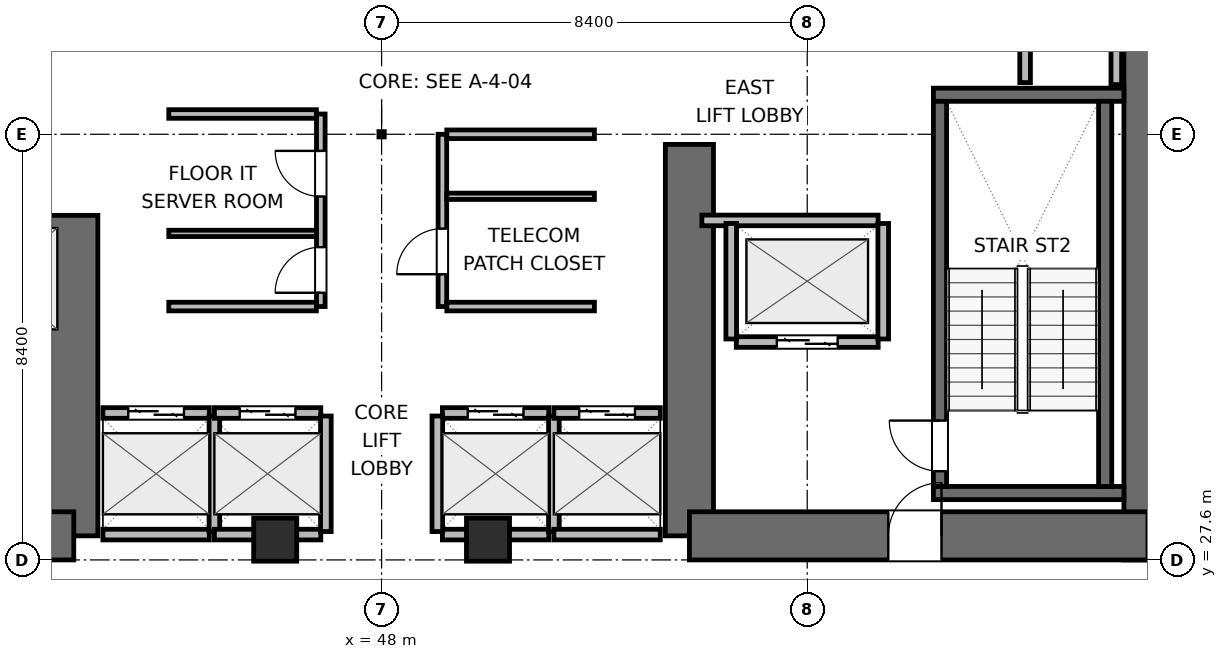
"""IFC4 building model, lengths in metres.
Left out: names, types, materials, properties, quantities, classifications, styles, units other than length and angle.
Written with IfcOpenShell. Run it as: python <this file> out.ifc"""

import sys

from ifc_helpers import new_model, si_unit, direction, frame, frame_2d, origin, origin_2d, place, context, subcontext, project, spatial, rectangle, extrude, element, fill, save


model = new_model("IFC4")
c1 = context("Model", 3, precision=1e-05, world=origin(), true_north=direction((0.0, 1.0)))
c2 = subcontext(c1, "Body", "Model", "MODEL_VIEW")
j1 = project(units=[si_unit("LENGTHUNIT", "METRE"), si_unit("PLANEANGLEUNIT", "RADIAN")], contexts=[c1])
p1 = place(None, origin())
s1 = spatial("IfcSite", under=j1, at=p1, CompositionType="ELEMENT")
p2 = place(p1, origin())
s2 = spatial("IfcBuilding", under=s1, at=p2, CompositionType="ELEMENT")
p3 = place(p2, frame((0.0, 0.0, 33.3)))
s3 = spatial("IfcBuildingStorey", under=s2, at=p3, CompositionType="ELEMENT", Elevation=33.3)
p4 = place(p3, frame((41.925, 28.075, 0.0), z_axis=(0.0, 0.0, 1.0), x_axis=(0.0, 1.0, 0.0)))
e1 = element("IfcWall", 1, at=p4, inside=s3, PredefinedType="SHEAR", context=c2, shape_type="SweptSolid", body=[
    extrude(rectangle(XDim=6.325, YDim=0.95, at=frame_2d((3.163, 0.0))), origin(), (0.0, 0.0, 1.0), 3.9),
])
p5 = place(p3, frame((32.875, 28.075, 0.0), z_axis=(0.0, 0.0, 1.0), x_axis=(1.0, 0.0, 0.0)))
e2 = element("IfcWall", 2, at=p5, inside=s3, PredefinedType="SHEAR", context=c2, shape_type="SweptSolid", body=[
    extrude(rectangle(XDim=9.05, YDim=0.95, at=frame_2d((4.525, 0.0))), origin(), (0.0, 0.0, 1.0), 3.9),
])
p6 = place(p5, frame((4.975, 0.0, 0.0)))
e3 = element("IfcOpeningElement", 3, at=p6, cuts=e2, PredefinedType="OPENING", context=c2, shape_type="SweptSolid", body=[
    extrude(rectangle(XDim=1.05, YDim=2.04, at=frame_2d((0.525, 1.02))), frame((0.0, 0.485, 0.0), z_axis=(0.0, -1.0, 0.0), x_axis=(1.0, 0.0, 0.0)), (0.0, 0.0, 1.0), 0.97),
])
p7 = place(p3, frame((54.075, 28.075, 0.0), z_axis=(0.0, 0.0, 1.0), x_axis=(0.0, 1.0, 0.0)))
e4 = element("IfcWall", 4, at=p7, inside=s3, PredefinedType="SHEAR", context=c2, shape_type="SweptSolid", body=[
    extrude(rectangle(XDim=7.725, YDim=0.95, at=frame_2d((3.863, 0.0))), origin(), (0.0, 0.0, 1.0), 3.9),
])
p8 = place(p3, frame((63.125, 27.6, 0.0), z_axis=(0.0, 0.0, 1.0), x_axis=(0.0, 1.0, 0.0)))
e5 = element("IfcWall", 5, at=p8, inside=s3, PredefinedType="SHEAR", context=c2, shape_type="SweptSolid", body=[
    extrude(rectangle(XDim=16.8, YDim=0.95, at=frame_2d((8.4, 0.0))), origin(), (0.0, 0.0, 1.0), 3.9),
])
p9 = place(p3, frame((54.075, 28.075, 0.0), z_axis=(0.0, 0.0, 1.0), x_axis=(1.0, 0.0, 0.0)))
e6 = element("IfcWall", 6, at=p9, inside=s3, PredefinedType="SHEAR", context=c2, shape_type="SweptSolid", body=[
    extrude(rectangle(XDim=9.05, YDim=0.95, at=frame_2d((4.525, 0.0))), origin(), (0.0, 0.0, 1.0), 3.9),
])
p10 = place(p9, frame((3.925, 0.0, 0.0)))
e7 = element("IfcOpeningElement", 7, at=p10, cuts=e6, PredefinedType="OPENING", context=c2, shape_type="SweptSolid", body=[
    extrude(rectangle(XDim=1.05, YDim=2.04, at=frame_2d((0.525, 1.02))), frame((0.0, 0.485, 0.0), z_axis=(0.0, -1.0, 0.0), x_axis=(1.0, 0.0, 0.0)), (0.0, 0.0, 1.0), 0.97),
])
for number, where, z_axis, x_axis in (
    (8, (58.89, 28.92, 0.0), (0.0, 0.0, 1.0), (1.0, 0.0, 0.0)),
    (9, (58.89, 36.78, 0.0), (0.0, 0.0, 1.0), (1.0, 0.0, 0.0)),
):
    element("IfcWall", number, at=place(p3, frame(where, z_axis=z_axis, x_axis=x_axis)), inside=s3, PredefinedType="SHEAR", context=c2, shape_type="SweptSolid", body=[
        extrude(rectangle(XDim=3.76, YDim=0.26, at=frame_2d((1.88, 0.0))), origin(), (0.0, 0.0, 1.0), 3.9),
    ])
p11 = place(p3, frame((59.02, 29.05, 0.0), z_axis=(0.0, 0.0, 1.0), x_axis=(0.0, 1.0, 0.0)))
e10 = element("IfcWall", 10, at=p11, inside=s3, PredefinedType="SHEAR", context=c2, shape_type="SweptSolid", body=[
    extrude(rectangle(XDim=7.6, YDim=0.26, at=frame_2d((3.8, 0.0))), origin(), (0.0, 0.0, 1.0), 3.9),
])
p12 = place(p11, frame((0.3, 0.0, 0.0)))
e11 = element("IfcOpeningElement", 11, at=p12, cuts=e10, PredefinedType="OPENING", context=c2, shape_type="SweptSolid", body=[
    extrude(rectangle(XDim=1.0, YDim=2.04, at=frame_2d((0.5, 1.02))), frame((0.0, 0.14, 0.0), z_axis=(0.0, -1.0, 0.0), x_axis=(1.0, 0.0, 0.0)), (0.0, 0.0, 1.0), 0.28),
])
p13 = place(p3, frame((62.28, 29.05, 0.0), z_axis=(0.0, 0.0, 1.0), x_axis=(0.0, 1.0, 0.0)))
e12 = element("IfcWall", 12, at=p13, inside=s3, PredefinedType="SHEAR", context=c2, shape_type="SweptSolid", body=[
    extrude(rectangle(XDim=7.6, YDim=0.26, at=frame_2d((3.8, 0.0))), origin(), (0.0, 0.0, 1.0), 3.9),
])
for number, where, z_axis, x_axis in (
    (13, (45.9, 28.0, 0.0), (0.0, 0.0, 1.0), (1.0, 0.0, 0.0)),
    (14, (50.1, 28.0, 0.0), (0.0, 0.0, 1.0), (1.0, 0.0, 0.0)),
):
    element("IfcColumn", number, at=place(p3, frame(where, z_axis=z_axis, x_axis=x_axis)), inside=s3, PredefinedType="COLUMN", context=c2, shape_type="SweptSolid", body=[
        extrude(rectangle(XDim=0.85, YDim=0.85, at=origin_2d()), origin(), (0.0, 0.0, 1.0), 3.9),
    ])
p14 = place(p3, frame((60.7, 37.02, 0.0), z_axis=(0.0, 0.0, 1.0), x_axis=(0.0, 1.0, 0.0)))
e15 = element("IfcWall", 15, at=p14, inside=s3, PredefinedType="PARTITIONING", context=c2, shape_type="SweptSolid", body=[
    extrude(rectangle(XDim=1.96, YDim=0.21, at=frame_2d((0.98, 0.0))), origin(), (0.0, 0.0, 1.0), 3.64),
])
p15 = place(p3, frame((62.5, 36.98, 0.0), z_axis=(0.0, 0.0, 1.0), x_axis=(0.0, 1.0, 0.0)))
e16 = element("IfcWall", 16, at=p15, inside=s3, PredefinedType="PARTITIONING", context=c2, shape_type="SweptSolid", body=[
    extrude(rectangle(XDim=2.04, YDim=0.21, at=frame_2d((1.02, 0.0))), origin(), (0.0, 0.0, 1.0), 3.64),
])
p16 = place(p3, frame((55.0, 31.9, 0.0), z_axis=(0.0, 0.0, 1.0), x_axis=(1.0, 0.0, 0.0)))
e17 = element("IfcWall", 17, at=p16, inside=s3, PredefinedType="PARTITIONING", context=c2, shape_type="SweptSolid", body=[
    extrude(rectangle(XDim=2.8, YDim=0.21, at=frame_2d((1.4, 0.0))), origin(), (0.0, 0.0, 1.0), 3.64),
])
p17 = place(p16, frame((0.8, 0.0, 0.0)))
e18 = element("IfcOpeningElement", 18, at=p17, cuts=e17, PredefinedType="OPENING", context=c2, shape_type="SweptSolid", body=[
    extrude(rectangle(XDim=1.2, YDim=2.04, at=frame_2d((0.6, 1.02))), frame((0.0, 0.115, 0.0), z_axis=(0.0, -1.0, 0.0), x_axis=(1.0, 0.0, 0.0)), (0.0, 0.0, 1.0), 0.23),
])
p18 = place(p3, frame((54.32, 34.3, 0.0), z_axis=(0.0, 0.0, 1.0), x_axis=(1.0, 0.0, 0.0)))
e19 = element("IfcWall", 19, at=p18, inside=s3, PredefinedType="PARTITIONING", context=c2, shape_type="SweptSolid", body=[
    extrude(rectangle(XDim=3.48, YDim=0.21, at=frame_2d((1.74, 0.0))), origin(), (0.0, 0.0, 1.0), 3.64),
])
for number, where, z_axis, x_axis in (
    (20, (54.9, 31.96, 0.0), (0.0, 0.0, 1.0), (0.0, 1.0, 0.0)),
    (21, (57.9, 31.96, 0.0), (0.0, 0.0, 1.0), (0.0, 1.0, 0.0)),
):
    element("IfcWall", number, at=place(p3, frame(where, z_axis=z_axis, x_axis=x_axis)), inside=s3, PredefinedType="PARTITIONING", context=c2, shape_type="SweptSolid", body=[
        extrude(rectangle(XDim=2.28, YDim=0.21, at=frame_2d((1.14, 0.0))), origin(), (0.0, 0.0, 1.0), 3.64),
    ])
p19 = place(p3, frame((42.5, 30.5, 0.0), z_axis=(0.0, 0.0, 1.0), x_axis=(1.0, 0.0, 0.0)))
e22 = element("IfcWall", 22, at=p19, inside=s3, PredefinedType="PARTITIONING", context=c2, shape_type="SweptSolid", body=[
    extrude(rectangle(XDim=2.1, YDim=0.21, at=frame_2d((1.05, 0.0))), origin(), (0.0, 0.0, 1.0), 3.64),
])
p20 = place(p19, frame((0.5, 0.0, 0.0)))
e23 = element("IfcOpeningElement", 23, at=p20, cuts=e22, PredefinedType="OPENING", context=c2, shape_type="SweptSolid", body=[
    extrude(rectangle(XDim=1.1, YDim=2.04, at=frame_2d((0.55, 1.02))), frame((0.0, 0.115, 0.0), z_axis=(0.0, -1.0, 0.0), x_axis=(1.0, 0.0, 0.0)), (0.0, 0.0, 1.0), 0.23),
])
p21 = place(p3, frame((42.5, 28.1, 0.0), z_axis=(0.0, 0.0, 1.0), x_axis=(1.0, 0.0, 0.0)))
e24 = element("IfcWall", 24, at=p21, inside=s3, PredefinedType="PARTITIONING", context=c2, shape_type="SweptSolid", body=[
    extrude(rectangle(XDim=2.1, YDim=0.21, at=frame_2d((1.05, 0.0))), origin(), (0.0, 0.0, 1.0), 2.525),
])
p22 = place(p3, frame((44.7, 28.16, 0.0), z_axis=(0.0, 0.0, 1.0), x_axis=(0.0, 1.0, 0.0)))
e25 = element("IfcWall", 25, at=p22, inside=s3, PredefinedType="PARTITIONING", context=c2, shape_type="SweptSolid", body=[
    extrude(rectangle(XDim=2.28, YDim=0.21, at=frame_2d((1.14, 0.0))), origin(), (0.0, 0.0, 1.0), 3.64),
])
p23 = place(p3, frame((44.7, 30.5, 0.0), z_axis=(0.0, 0.0, 1.0), x_axis=(1.0, 0.0, 0.0)))
e26 = element("IfcWall", 26, at=p23, inside=s3, PredefinedType="PARTITIONING", context=c2, shape_type="SweptSolid", body=[
    extrude(rectangle(XDim=2.1, YDim=0.21, at=frame_2d((1.05, 0.0))), origin(), (0.0, 0.0, 1.0), 3.64),
])
p24 = place(p23, frame((0.5, 0.0, 0.0)))
e27 = element("IfcOpeningElement", 27, at=p24, cuts=e26, PredefinedType="OPENING", context=c2, shape_type="SweptSolid", body=[
    extrude(rectangle(XDim=1.1, YDim=2.04, at=frame_2d((0.55, 1.02))), frame((0.0, 0.115, 0.0), z_axis=(0.0, -1.0, 0.0), x_axis=(1.0, 0.0, 0.0)), (0.0, 0.0, 1.0), 0.23),
])
p25 = place(p3, frame((44.7, 28.1, 0.0), z_axis=(0.0, 0.0, 1.0), x_axis=(1.0, 0.0, 0.0)))
e28 = element("IfcWall", 28, at=p25, inside=s3, PredefinedType="PARTITIONING", context=c2, shape_type="SweptSolid", body=[
    extrude(rectangle(XDim=2.1, YDim=0.21, at=frame_2d((1.05, 0.0))), origin(), (0.0, 0.0, 1.0), 2.525),
])
p26 = place(p3, frame((46.9, 28.16, 0.0), z_axis=(0.0, 0.0, 1.0), x_axis=(0.0, 1.0, 0.0)))
e29 = element("IfcWall", 29, at=p26, inside=s3, PredefinedType="PARTITIONING", context=c2, shape_type="SweptSolid", body=[
    extrude(rectangle(XDim=2.28, YDim=0.21, at=frame_2d((1.14, 0.0))), origin(), (0.0, 0.0, 1.0), 3.64),
])
p27 = place(p3, frame((49.2, 30.5, 0.0), z_axis=(0.0, 0.0, 1.0), x_axis=(1.0, 0.0, 0.0)))
e30 = element("IfcWall", 30, at=p27, inside=s3, PredefinedType="PARTITIONING", context=c2, shape_type="SweptSolid", body=[
    extrude(rectangle(XDim=2.1, YDim=0.21, at=frame_2d((1.05, 0.0))), origin(), (0.0, 0.0, 1.0), 3.64),
])
p28 = place(p27, frame((0.5, 0.0, 0.0)))
e31 = element("IfcOpeningElement", 31, at=p28, cuts=e30, PredefinedType="OPENING", context=c2, shape_type="SweptSolid", body=[
    extrude(rectangle(XDim=1.1, YDim=2.04, at=frame_2d((0.55, 1.02))), frame((0.0, 0.115, 0.0), z_axis=(0.0, -1.0, 0.0), x_axis=(1.0, 0.0, 0.0)), (0.0, 0.0, 1.0), 0.23),
])
p29 = place(p3, frame((49.2, 28.1, 0.0), z_axis=(0.0, 0.0, 1.0), x_axis=(1.0, 0.0, 0.0)))
e32 = element("IfcWall", 32, at=p29, inside=s3, PredefinedType="PARTITIONING", context=c2, shape_type="SweptSolid", body=[
    extrude(rectangle(XDim=2.1, YDim=0.21, at=frame_2d((1.05, 0.0))), origin(), (0.0, 0.0, 1.0), 2.525),
])
for number, where, z_axis, x_axis in (
    (33, (49.1, 28.16, 0.0), (0.0, 0.0, 1.0), (0.0, 1.0, 0.0)),
    (34, (51.4, 28.16, 0.0), (0.0, 0.0, 1.0), (0.0, 1.0, 0.0)),
):
    element("IfcWall", number, at=place(p3, frame(where, z_axis=z_axis, x_axis=x_axis)), inside=s3, PredefinedType="PARTITIONING", context=c2, shape_type="SweptSolid", body=[
        extrude(rectangle(XDim=2.28, YDim=0.21, at=frame_2d((1.14, 0.0))), origin(), (0.0, 0.0, 1.0), 3.64),
    ])
p30 = place(p3, frame((51.4, 30.5, 0.0), z_axis=(0.0, 0.0, 1.0), x_axis=(1.0, 0.0, 0.0)))
e35 = element("IfcWall", 35, at=p30, inside=s3, PredefinedType="PARTITIONING", context=c2, shape_type="SweptSolid", body=[
    extrude(rectangle(XDim=2.1, YDim=0.21, at=frame_2d((1.05, 0.0))), origin(), (0.0, 0.0, 1.0), 3.64),
])
p31 = place(p30, frame((0.5, 0.0, 0.0)))
e36 = element("IfcOpeningElement", 36, at=p31, cuts=e35, PredefinedType="OPENING", context=c2, shape_type="SweptSolid", body=[
    extrude(rectangle(XDim=1.1, YDim=2.04, at=frame_2d((0.55, 1.02))), frame((0.0, 0.115, 0.0), z_axis=(0.0, -1.0, 0.0), x_axis=(1.0, 0.0, 0.0)), (0.0, 0.0, 1.0), 0.23),
])
p32 = place(p3, frame((51.4, 28.1, 0.0), z_axis=(0.0, 0.0, 1.0), x_axis=(1.0, 0.0, 0.0)))
e37 = element("IfcWall", 37, at=p32, inside=s3, PredefinedType="PARTITIONING", context=c2, shape_type="SweptSolid", body=[
    extrude(rectangle(XDim=2.1, YDim=0.21, at=frame_2d((1.05, 0.0))), origin(), (0.0, 0.0, 1.0), 2.525),
])
p33 = place(p3, frame((46.8, 32.6, 0.0), z_axis=(0.0, 0.0, 1.0), x_axis=(0.0, 1.0, 0.0)))
e38 = element("IfcWall", 38, at=p33, inside=s3, PredefinedType="PARTITIONING", context=c2, shape_type="SweptSolid", body=[
    extrude(rectangle(XDim=3.8, YDim=0.17, at=frame_2d((1.9, 0.0))), origin(), (0.0, 0.0, 1.0), 3.64),
])
p34 = place(p33, frame((0.272, 0.0, 0.0)))
e39 = element("IfcOpeningElement", 39, at=p34, cuts=e38, PredefinedType="OPENING", context=c2, shape_type="SweptSolid", body=[
    extrude(rectangle(XDim=0.9, YDim=2.02, at=frame_2d((0.45, 1.01))), frame((0.0, 0.095, 0.0), z_axis=(0.0, -1.0, 0.0), x_axis=(1.0, 0.0, 0.0)), (0.0, 0.0, 1.0), 0.19),
])
p35 = place(p33, frame((2.172, 0.0, 0.0)))
e40 = element("IfcOpeningElement", 40, at=p35, cuts=e38, PredefinedType="OPENING", context=c2, shape_type="SweptSolid", body=[
    extrude(rectangle(XDim=0.9, YDim=2.02, at=frame_2d((0.45, 1.01))), frame((0.0, 0.095, 0.0), z_axis=(0.0, -1.0, 0.0), x_axis=(1.0, 0.0, 0.0)), (0.0, 0.0, 1.0), 0.19),
])
for number, where, z_axis, x_axis in (
    (41, (43.8, 32.6, 0.0), (0.0, 0.0, 1.0), (1.0, 0.0, 0.0)),
    (42, (43.8, 36.4, 0.0), (0.0, 0.0, 1.0), (1.0, 0.0, 0.0)),
):
    element("IfcWall", number, at=place(p3, frame(where, z_axis=z_axis, x_axis=x_axis)), inside=s3, PredefinedType="PARTITIONING", context=c2, shape_type="SweptSolid", body=[
        extrude(rectangle(XDim=2.913, YDim=0.17, at=frame_2d((1.457, 0.0))), origin(), (0.0, 0.0, 1.0), 3.64),
    ])
p36 = place(p3, frame((43.8, 34.044, 0.0), z_axis=(0.0, 0.0, 1.0), x_axis=(1.0, 0.0, 0.0)))
e43 = element("IfcWall", 43, at=p36, inside=s3, PredefinedType="PARTITIONING", context=c2, shape_type="SweptSolid", body=[
    extrude(rectangle(XDim=2.913, YDim=0.125, at=frame_2d((1.457, 0.0))), origin(), (0.0, 0.0, 1.0), 3.64),
])
p37 = place(p3, frame((49.2, 32.6, 0.0), z_axis=(0.0, 0.0, 1.0), x_axis=(0.0, 1.0, 0.0)))
e44 = element("IfcWall", 44, at=p37, inside=s3, PredefinedType="PARTITIONING", context=c2, shape_type="SweptSolid", body=[
    extrude(rectangle(XDim=3.4, YDim=0.17, at=frame_2d((1.7, 0.0))), origin(), (0.0, 0.0, 1.0), 3.64),
])
p38 = place(p37, frame((0.638, 0.0, 0.0)))
e45 = element("IfcOpeningElement", 45, at=p38, cuts=e44, PredefinedType="OPENING", context=c2, shape_type="SweptSolid", body=[
    extrude(rectangle(XDim=0.9, YDim=2.02, at=frame_2d((0.45, 1.01))), frame((0.0, 0.095, 0.0), z_axis=(0.0, -1.0, 0.0), x_axis=(1.0, 0.0, 0.0)), (0.0, 0.0, 1.0), 0.19),
])
for number, where, z_axis, x_axis in (
    (46, (49.287, 32.6, 0.0), (0.0, 0.0, 1.0), (1.0, 0.0, 0.0)),
    (47, (49.287, 36.0, 0.0), (0.0, 0.0, 1.0), (1.0, 0.0, 0.0)),
):
    element("IfcWall", number, at=place(p3, frame(where, z_axis=z_axis, x_axis=x_axis)), inside=s3, PredefinedType="PARTITIONING", context=c2, shape_type="SweptSolid", body=[
        extrude(rectangle(XDim=2.913, YDim=0.17, at=frame_2d((1.457, 0.0))), origin(), (0.0, 0.0, 1.0), 3.64),
    ])
p39 = place(p3, frame((49.287, 34.776, 0.0), z_axis=(0.0, 0.0, 1.0), x_axis=(1.0, 0.0, 0.0)))
e48 = element("IfcWall", 48, at=p39, inside=s3, PredefinedType="PARTITIONING", context=c2, shape_type="SweptSolid", body=[
    extrude(rectangle(XDim=2.913, YDim=0.125, at=frame_2d((1.457, 0.0))), origin(), (0.0, 0.0, 1.0), 3.64),
])
p40 = place(p12, origin())
e49 = element("IfcDoor", 49, at=p40, inside=s3, OperationType="SINGLE_SWING_RIGHT", PredefinedType="DOOR", context=c2, shape_type="SweptSolid", body=[
    extrude(rectangle(XDim=1.0, YDim=2.04, at=frame_2d((0.5, 1.02))), frame((0.0, 0.025, 0.0), z_axis=(0.0, -1.0, 0.0), x_axis=(1.0, 0.0, 0.0)), (0.0, 0.0, 1.0), 0.05),
])
fill(e11, e49)
p41 = place(p17, origin())
e50 = element("IfcDoor", 50, at=p41, inside=s3, OperationType="DOUBLE_DOOR_SLIDING", PredefinedType="DOOR", context=c2, shape_type="SweptSolid", body=[
    extrude(rectangle(XDim=1.2, YDim=2.04, at=frame_2d((0.6, 1.02))), frame((0.0, 0.025, 0.0), z_axis=(0.0, -1.0, 0.0), x_axis=(1.0, 0.0, 0.0)), (0.0, 0.0, 1.0), 0.05),
])
fill(e18, e50)
p42 = place(p20, origin())
e51 = element("IfcDoor", 51, at=p42, inside=s3, OperationType="DOUBLE_DOOR_SLIDING", PredefinedType="DOOR", context=c2, shape_type="SweptSolid", body=[
    extrude(rectangle(XDim=1.1, YDim=2.04, at=frame_2d((0.55, 1.02))), frame((0.0, 0.025, 0.0), z_axis=(0.0, -1.0, 0.0), x_axis=(1.0, 0.0, 0.0)), (0.0, 0.0, 1.0), 0.05),
])
fill(e23, e51)
p43 = place(p24, origin())
e52 = element("IfcDoor", 52, at=p43, inside=s3, OperationType="DOUBLE_DOOR_SLIDING", PredefinedType="DOOR", context=c2, shape_type="SweptSolid", body=[
    extrude(rectangle(XDim=1.1, YDim=2.04, at=frame_2d((0.55, 1.02))), frame((0.0, 0.025, 0.0), z_axis=(0.0, -1.0, 0.0), x_axis=(1.0, 0.0, 0.0)), (0.0, 0.0, 1.0), 0.05),
])
fill(e27, e52)
p44 = place(p28, origin())
e53 = element("IfcDoor", 53, at=p44, inside=s3, OperationType="DOUBLE_DOOR_SLIDING", PredefinedType="DOOR", context=c2, shape_type="SweptSolid", body=[
    extrude(rectangle(XDim=1.1, YDim=2.04, at=frame_2d((0.55, 1.02))), frame((0.0, 0.025, 0.0), z_axis=(0.0, -1.0, 0.0), x_axis=(1.0, 0.0, 0.0)), (0.0, 0.0, 1.0), 0.05),
])
fill(e31, e53)
p45 = place(p31, origin())
e54 = element("IfcDoor", 54, at=p45, inside=s3, OperationType="DOUBLE_DOOR_SLIDING", PredefinedType="DOOR", context=c2, shape_type="SweptSolid", body=[
    extrude(rectangle(XDim=1.1, YDim=2.04, at=frame_2d((0.55, 1.02))), frame((0.0, 0.025, 0.0), z_axis=(0.0, -1.0, 0.0), x_axis=(1.0, 0.0, 0.0)), (0.0, 0.0, 1.0), 0.05),
])
fill(e36, e54)
p46 = place(p10, origin())
e55 = element("IfcDoor", 55, at=p46, inside=s3, OperationType="SINGLE_SWING_RIGHT", PredefinedType="DOOR", context=c2, shape_type="SweptSolid", body=[
    extrude(rectangle(XDim=1.05, YDim=2.04, at=frame_2d((0.525, 1.02))), frame((0.0, 0.025, 0.0), z_axis=(0.0, -1.0, 0.0), x_axis=(1.0, 0.0, 0.0)), (0.0, 0.0, 1.0), 0.05),
])
fill(e7, e55)
p47 = place(p34, origin())
e56 = element("IfcDoor", 56, at=p47, inside=s3, OperationType="SINGLE_SWING_LEFT", PredefinedType="DOOR", context=c2, shape_type="SweptSolid", body=[
    extrude(rectangle(XDim=0.9, YDim=2.02, at=frame_2d((0.45, 1.01))), frame((0.0, 0.025, 0.0), z_axis=(0.0, -1.0, 0.0), x_axis=(1.0, 0.0, 0.0)), (0.0, 0.0, 1.0), 0.05),
])
fill(e39, e56)
p48 = place(p35, origin())
e57 = element("IfcDoor", 57, at=p48, inside=s3, OperationType="SINGLE_SWING_RIGHT", PredefinedType="DOOR", context=c2, shape_type="SweptSolid", body=[
    extrude(rectangle(XDim=0.9, YDim=2.02, at=frame_2d((0.45, 1.01))), frame((0.0, 0.025, 0.0), z_axis=(0.0, -1.0, 0.0), x_axis=(1.0, 0.0, 0.0)), (0.0, 0.0, 1.0), 0.05),
])
fill(e40, e57)
p49 = place(p38, origin())
e58 = element("IfcDoor", 58, at=p49, inside=s3, OperationType="SINGLE_SWING_LEFT", PredefinedType="DOOR", context=c2, shape_type="SweptSolid", body=[
    extrude(rectangle(XDim=0.9, YDim=2.02, at=frame_2d((0.45, 1.01))), frame((0.0, 0.025, 0.0), z_axis=(0.0, -1.0, 0.0), x_axis=(1.0, 0.0, 0.0)), (0.0, 0.0, 1.0), 0.05),
])
fill(e45, e58)
save(model, sys.argv[1])
